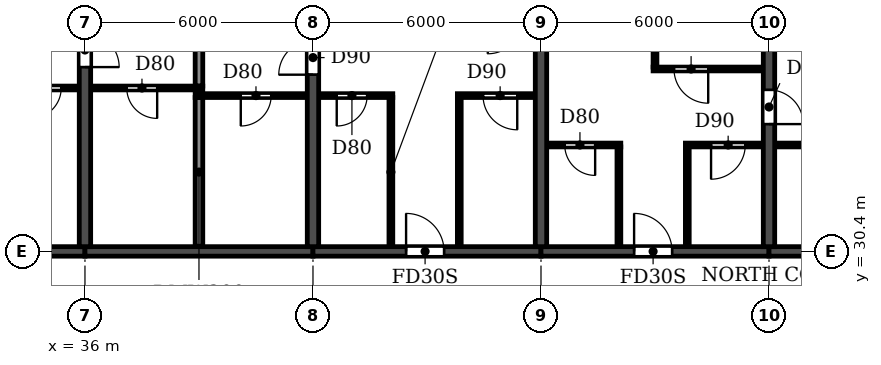
"""IFC4 building model, lengths in metres.
Left out: names, types, materials, properties, quantities, classifications, styles, units other than length and angle.
Written with IfcOpenShell. Run it as: python <this file> out.ifc"""

import sys

from ifc_helpers import new_model, si_unit, direction, frame, frame_2d, origin, place, context, subcontext, project, spatial, rectangle, extrude, element, fill, save


model = new_model("IFC4")
c1 = context("Model", 3, precision=1e-05, world=origin(), true_north=direction((0.0, 1.0)))
c2 = subcontext(c1, "Body", "Model", "MODEL_VIEW")
j1 = project(units=[si_unit("LENGTHUNIT", "METRE"), si_unit("PLANEANGLEUNIT", "RADIAN")], contexts=[c1])
p1 = place(None, origin())
s1 = spatial("IfcSite", under=j1, at=p1, CompositionType="ELEMENT")
p2 = place(p1, origin())
s2 = spatial("IfcBuilding", under=s1, at=p2, CompositionType="ELEMENT")
p3 = place(p2, frame((0.0, 0.0, 155.4)))
s3 = spatial("IfcBuildingStorey", under=s2, at=p3, CompositionType="ELEMENT", Elevation=155.4)
p4 = place(p3, frame((36.0, 30.525, 0.0), z_axis=(0.0, 0.0, 1.0), x_axis=(0.0, 1.0, 0.0)))
e1 = element("IfcWall", 1, at=p4, inside=s3, PredefinedType="SHEAR", context=c2, shape_type="SweptSolid", body=[
    extrude(rectangle(XDim=11.675, YDim=0.3, at=frame_2d((5.837, 0.0))), origin(), (0.0, 0.0, 1.0), 3.0),
])
p5 = place(p4, frame((4.725, 0.0, 0.0)))
e2 = element("IfcOpeningElement", 2, at=p5, cuts=e1, PredefinedType="OPENING", context=c2, shape_type="SweptSolid", body=[
    extrude(rectangle(XDim=0.9, YDim=2.1, at=frame_2d((0.45, 1.05))), frame((0.0, 0.16, 0.0), z_axis=(0.0, -1.0, 0.0), x_axis=(1.0, 0.0, 0.0)), (0.0, 0.0, 1.0), 0.32),
])
p6 = place(p3, frame((42.0, 30.525, 0.0), z_axis=(0.0, 0.0, 1.0), x_axis=(0.0, 1.0, 0.0)))
e3 = element("IfcWall", 3, at=p6, inside=s3, PredefinedType="SHEAR", context=c2, shape_type="SweptSolid", body=[
    extrude(rectangle(XDim=11.675, YDim=0.3, at=frame_2d((5.837, 0.0))), origin(), (0.0, 0.0, 1.0), 3.0),
])
p7 = place(p6, frame((4.525, 0.0, 0.0)))
e4 = element("IfcOpeningElement", 4, at=p7, cuts=e3, PredefinedType="OPENING", context=c2, shape_type="SweptSolid", body=[
    extrude(rectangle(XDim=0.9, YDim=2.1, at=frame_2d((0.45, 1.05))), frame((0.0, 0.16, 0.0), z_axis=(0.0, -1.0, 0.0), x_axis=(1.0, 0.0, 0.0)), (0.0, 0.0, 1.0), 0.32),
])
p8 = place(p3, frame((48.0, 30.525, 0.0), z_axis=(0.0, 0.0, 1.0), x_axis=(0.0, 1.0, 0.0)))
e5 = element("IfcWall", 5, at=p8, inside=s3, PredefinedType="SHEAR", context=c2, shape_type="SweptSolid", body=[
    extrude(rectangle(XDim=11.675, YDim=0.3, at=frame_2d((5.837, 0.0))), origin(), (0.0, 0.0, 1.0), 3.0),
])
p9 = place(p3, frame((54.0, 30.525, 0.0), z_axis=(0.0, 0.0, 1.0), x_axis=(0.0, 1.0, 0.0)))
e6 = element("IfcWall", 6, at=p9, inside=s3, PredefinedType="SHEAR", context=c2, shape_type="SweptSolid", body=[
    extrude(rectangle(XDim=11.675, YDim=0.3, at=frame_2d((5.837, 0.0))), origin(), (0.0, 0.0, 1.0), 3.0),
])
p10 = place(p9, frame((3.225, 0.0, 0.0)))
e7 = element("IfcOpeningElement", 7, at=p10, cuts=e6, PredefinedType="OPENING", context=c2, shape_type="SweptSolid", body=[
    extrude(rectangle(XDim=0.9, YDim=2.1, at=frame_2d((0.45, 1.05))), frame((0.0, 0.16, 0.0), z_axis=(0.0, -1.0, 0.0), x_axis=(1.0, 0.0, 0.0)), (0.0, 0.0, 1.0), 0.32),
])
p11 = place(p3, frame((30.0, 30.4, 0.0), z_axis=(0.0, 0.0, 1.0), x_axis=(1.0, 0.0, 0.0)))
e8 = element("IfcWall", 8, at=p11, inside=s3, PredefinedType="SHEAR", context=c2, shape_type="SweptSolid", body=[
    extrude(rectangle(XDim=6.0, YDim=0.25, at=frame_2d((3.0, 0.0))), origin(), (0.0, 0.0, 1.0), 2.4),
])
p12 = place(p11, frame((2.55, 0.0, 0.0)))
e9 = element("IfcOpeningElement", 9, at=p12, cuts=e8, PredefinedType="OPENING", context=c2, shape_type="SweptSolid", body=[
    extrude(rectangle(XDim=1.0, YDim=2.1, at=frame_2d((0.5, 1.05))), frame((0.0, 0.135, 0.0), z_axis=(0.0, -1.0, 0.0), x_axis=(1.0, 0.0, 0.0)), (0.0, 0.0, 1.0), 0.27),
])
p13 = place(p3, frame((36.0, 30.4, 0.0), z_axis=(0.0, 0.0, 1.0), x_axis=(1.0, 0.0, 0.0)))
e10 = element("IfcWall", 10, at=p13, inside=s3, PredefinedType="SHEAR", context=c2, shape_type="SweptSolid", body=[
    extrude(rectangle(XDim=6.0, YDim=0.25, at=frame_2d((3.0, 0.0))), origin(), (0.0, 0.0, 1.0), 2.4),
])
p14 = place(p3, frame((42.0, 30.4, 0.0), z_axis=(0.0, 0.0, 1.0), x_axis=(1.0, 0.0, 0.0)))
e11 = element("IfcWall", 11, at=p14, inside=s3, PredefinedType="SHEAR", context=c2, shape_type="SweptSolid", body=[
    extrude(rectangle(XDim=6.0, YDim=0.25, at=frame_2d((3.0, 0.0))), origin(), (0.0, 0.0, 1.0), 2.4),
])
p15 = place(p14, frame((2.45, 0.0, 0.0)))
e12 = element("IfcOpeningElement", 12, at=p15, cuts=e11, PredefinedType="OPENING", context=c2, shape_type="SweptSolid", body=[
    extrude(rectangle(XDim=1.0, YDim=2.1, at=frame_2d((0.5, 1.05))), frame((0.0, 0.135, 0.0), z_axis=(0.0, -1.0, 0.0), x_axis=(1.0, 0.0, 0.0)), (0.0, 0.0, 1.0), 0.27),
])
p16 = place(p3, frame((48.0, 30.4, 0.0), z_axis=(0.0, 0.0, 1.0), x_axis=(1.0, 0.0, 0.0)))
e13 = element("IfcWall", 13, at=p16, inside=s3, PredefinedType="SHEAR", context=c2, shape_type="SweptSolid", body=[
    extrude(rectangle(XDim=6.0, YDim=0.25, at=frame_2d((3.0, 0.0))), origin(), (0.0, 0.0, 1.0), 2.4),
])
p17 = place(p16, frame((2.45, 0.0, 0.0)))
e14 = element("IfcOpeningElement", 14, at=p17, cuts=e13, PredefinedType="OPENING", context=c2, shape_type="SweptSolid", body=[
    extrude(rectangle(XDim=1.0, YDim=2.1, at=frame_2d((0.5, 1.05))), frame((0.0, 0.135, 0.0), z_axis=(0.0, -1.0, 0.0), x_axis=(1.0, 0.0, 0.0)), (0.0, 0.0, 1.0), 0.27),
])
p18 = place(p3, frame((54.0, 30.4, 0.0), z_axis=(0.0, 0.0, 1.0), x_axis=(1.0, 0.0, 0.0)))
e15 = element("IfcWall", 15, at=p18, inside=s3, PredefinedType="SHEAR", context=c2, shape_type="SweptSolid", body=[
    extrude(rectangle(XDim=6.0, YDim=0.25, at=frame_2d((3.0, 0.0))), origin(), (0.0, 0.0, 1.0), 2.4),
])
p19 = place(p3, frame((39.0, 30.535, 0.0), z_axis=(0.0, 0.0, 1.0), x_axis=(0.0, 1.0, 0.0)))
e16 = element("IfcWall", 16, at=p19, inside=s3, PredefinedType="PARTITIONING", context=c2, shape_type="SweptSolid", body=[
    extrude(rectangle(XDim=3.915, YDim=0.2, at=frame_2d((1.958, 0.0))), origin(), (0.0, 0.0, 1.0), 3.0),
])
p20 = place(p3, frame((39.0, 34.75, 0.0), z_axis=(0.0, 0.0, 1.0), x_axis=(0.0, 1.0, 0.0)))
e17 = element("IfcWall", 17, at=p20, inside=s3, PredefinedType="PARTITIONING", context=c2, shape_type="SweptSolid", body=[
    extrude(rectangle(XDim=7.59, YDim=0.2, at=frame_2d((3.795, 0.0))), origin(), (0.0, 0.0, 1.0), 3.0),
])
p21 = place(p3, frame((48.16, 33.2, 0.0), z_axis=(0.0, 0.0, 1.0), x_axis=(1.0, 0.0, 0.0)))
e18 = element("IfcWall", 18, at=p21, inside=s3, PredefinedType="PARTITIONING", context=c2, shape_type="SweptSolid", body=[
    extrude(rectangle(XDim=1.94, YDim=0.1, at=frame_2d((0.97, 0.0))), origin(), (0.0, 0.0, 1.0), 3.0),
])
p22 = place(p21, frame((0.465, 0.0, 0.0)))
e19 = element("IfcOpeningElement", 19, at=p22, cuts=e18, PredefinedType="OPENING", context=c2, shape_type="SweptSolid", body=[
    extrude(rectangle(XDim=0.8, YDim=2.1, at=frame_2d((0.4, 1.05))), frame((0.0, 0.06, 0.0), z_axis=(0.0, -1.0, 0.0), x_axis=(1.0, 0.0, 0.0)), (0.0, 0.0, 1.0), 0.12),
])
p23 = place(p3, frame((51.8, 33.2, 0.0), z_axis=(0.0, 0.0, 1.0), x_axis=(1.0, 0.0, 0.0)))
e20 = element("IfcWall", 20, at=p23, inside=s3, PredefinedType="PARTITIONING", context=c2, shape_type="SweptSolid", body=[
    extrude(rectangle(XDim=2.04, YDim=0.1, at=frame_2d((1.02, 0.0))), origin(), (0.0, 0.0, 1.0), 3.0),
])
p24 = place(p23, frame((0.675, 0.0, 0.0)))
e21 = element("IfcOpeningElement", 21, at=p24, cuts=e20, PredefinedType="OPENING", context=c2, shape_type="SweptSolid", body=[
    extrude(rectangle(XDim=0.9, YDim=2.1, at=frame_2d((0.45, 1.05))), frame((0.0, 0.06, 0.0), z_axis=(0.0, -1.0, 0.0), x_axis=(1.0, 0.0, 0.0)), (0.0, 0.0, 1.0), 0.12),
])
p25 = place(p3, frame((54.16, 33.2, 0.0), z_axis=(0.0, 0.0, 1.0), x_axis=(1.0, 0.0, 0.0)))
e22 = element("IfcWall", 22, at=p25, inside=s3, PredefinedType="PARTITIONING", context=c2, shape_type="SweptSolid", body=[
    extrude(rectangle(XDim=2.74, YDim=0.1, at=frame_2d((1.37, 0.0))), origin(), (0.0, 0.0, 1.0), 3.0),
])
p26 = place(p25, frame((0.94, 0.0, 0.0)))
e23 = element("IfcOpeningElement", 23, at=p26, cuts=e22, PredefinedType="OPENING", context=c2, shape_type="SweptSolid", body=[
    extrude(rectangle(XDim=0.8, YDim=2.1, at=frame_2d((0.4, 1.05))), frame((0.0, 0.06, 0.0), z_axis=(0.0, -1.0, 0.0), x_axis=(1.0, 0.0, 0.0)), (0.0, 0.0, 1.0), 0.12),
])
p27 = place(p3, frame((38.9, 34.5, 0.0), z_axis=(0.0, 0.0, 1.0), x_axis=(1.0, 0.0, 0.0)))
e24 = element("IfcWall", 24, at=p27, inside=s3, PredefinedType="PARTITIONING", context=c2, shape_type="SweptSolid", body=[
    extrude(rectangle(XDim=2.94, YDim=0.1, at=frame_2d((1.47, 0.0))), origin(), (0.0, 0.0, 1.0), 3.0),
])
p28 = place(p27, frame((1.2, 0.0, 0.0)))
e25 = element("IfcOpeningElement", 25, at=p28, cuts=e24, PredefinedType="OPENING", context=c2, shape_type="SweptSolid", body=[
    extrude(rectangle(XDim=0.8, YDim=2.1, at=frame_2d((0.4, 1.05))), frame((0.0, 0.06, 0.0), z_axis=(0.0, -1.0, 0.0), x_axis=(1.0, 0.0, 0.0)), (0.0, 0.0, 1.0), 0.12),
])
p29 = place(p3, frame((42.16, 34.5, 0.0), z_axis=(0.0, 0.0, 1.0), x_axis=(1.0, 0.0, 0.0)))
e26 = element("IfcWall", 26, at=p29, inside=s3, PredefinedType="PARTITIONING", context=c2, shape_type="SweptSolid", body=[
    extrude(rectangle(XDim=1.94, YDim=0.1, at=frame_2d((0.97, 0.0))), origin(), (0.0, 0.0, 1.0), 3.0),
])
p30 = place(p29, frame((0.465, 0.0, 0.0)))
e27 = element("IfcOpeningElement", 27, at=p30, cuts=e26, PredefinedType="OPENING", context=c2, shape_type="SweptSolid", body=[
    extrude(rectangle(XDim=0.8, YDim=2.1, at=frame_2d((0.4, 1.05))), frame((0.0, 0.06, 0.0), z_axis=(0.0, -1.0, 0.0), x_axis=(1.0, 0.0, 0.0)), (0.0, 0.0, 1.0), 0.12),
])
p31 = place(p3, frame((45.8, 34.5, 0.0), z_axis=(0.0, 0.0, 1.0), x_axis=(1.0, 0.0, 0.0)))
e28 = element("IfcWall", 28, at=p31, inside=s3, PredefinedType="PARTITIONING", context=c2, shape_type="SweptSolid", body=[
    extrude(rectangle(XDim=2.04, YDim=0.1, at=frame_2d((1.02, 0.0))), origin(), (0.0, 0.0, 1.0), 3.0),
])
p32 = place(p31, frame((0.675, 0.0, 0.0)))
e29 = element("IfcOpeningElement", 29, at=p32, cuts=e28, PredefinedType="OPENING", context=c2, shape_type="SweptSolid", body=[
    extrude(rectangle(XDim=0.9, YDim=2.1, at=frame_2d((0.45, 1.05))), frame((0.0, 0.06, 0.0), z_axis=(0.0, -1.0, 0.0), x_axis=(1.0, 0.0, 0.0)), (0.0, 0.0, 1.0), 0.12),
])
p33 = place(p3, frame((33.9, 34.7, 0.0), z_axis=(0.0, 0.0, 1.0), x_axis=(1.0, 0.0, 0.0)))
e30 = element("IfcWall", 30, at=p33, inside=s3, PredefinedType="PARTITIONING", context=c2, shape_type="SweptSolid", body=[
    extrude(rectangle(XDim=1.94, YDim=0.1, at=frame_2d((0.97, 0.0))), origin(), (0.0, 0.0, 1.0), 3.0),
])
p34 = place(p33, frame((0.675, 0.0, 0.0)))
e31 = element("IfcOpeningElement", 31, at=p34, cuts=e30, PredefinedType="OPENING", context=c2, shape_type="SweptSolid", body=[
    extrude(rectangle(XDim=0.8, YDim=2.1, at=frame_2d((0.4, 1.05))), frame((0.0, 0.06, 0.0), z_axis=(0.0, -1.0, 0.0), x_axis=(1.0, 0.0, 0.0)), (0.0, 0.0, 1.0), 0.12),
])
p35 = place(p3, frame((36.16, 34.7, 0.0), z_axis=(0.0, 0.0, 1.0), x_axis=(1.0, 0.0, 0.0)))
e32 = element("IfcWall", 32, at=p35, inside=s3, PredefinedType="PARTITIONING", context=c2, shape_type="SweptSolid", body=[
    extrude(rectangle(XDim=2.94, YDim=0.1, at=frame_2d((1.47, 0.0))), origin(), (0.0, 0.0, 1.0), 3.0),
])
p36 = place(p35, frame((0.94, 0.0, 0.0)))
e33 = element("IfcOpeningElement", 33, at=p36, cuts=e32, PredefinedType="OPENING", context=c2, shape_type="SweptSolid", body=[
    extrude(rectangle(XDim=0.8, YDim=2.1, at=frame_2d((0.4, 1.05))), frame((0.0, 0.06, 0.0), z_axis=(0.0, -1.0, 0.0), x_axis=(1.0, 0.0, 0.0)), (0.0, 0.0, 1.0), 0.12),
])
p37 = place(p3, frame((50.95, 35.2, 0.0), z_axis=(0.0, 0.0, 1.0), x_axis=(1.0, 0.0, 0.0)))
e34 = element("IfcWall", 34, at=p37, inside=s3, PredefinedType="PARTITIONING", context=c2, shape_type="SweptSolid", body=[
    extrude(rectangle(XDim=2.89, YDim=0.1, at=frame_2d((1.445, 0.0))), origin(), (0.0, 0.0, 1.0), 3.0),
])
p38 = place(p37, frame((0.55, 0.0, 0.0)))
e35 = element("IfcOpeningElement", 35, at=p38, cuts=e34, PredefinedType="OPENING", context=c2, shape_type="SweptSolid", body=[
    extrude(rectangle(XDim=0.9, YDim=2.1, at=frame_2d((0.45, 1.05))), frame((0.0, 0.06, 0.0), z_axis=(0.0, -1.0, 0.0), x_axis=(1.0, 0.0, 0.0)), (0.0, 0.0, 1.0), 0.12),
])
for number, where, z_axis, x_axis in (
    (36, (44.05, 30.535, 0.0), (0.0, 0.0, 1.0), (0.0, 1.0, 0.0)),
    (37, (45.85, 30.535, 0.0), (0.0, 0.0, 1.0), (0.0, 1.0, 0.0)),
):
    element("IfcWall", number, at=place(p3, frame(where, z_axis=z_axis, x_axis=x_axis)), inside=s3, PredefinedType="PARTITIONING", context=c2, shape_type="SweptSolid", body=[
        extrude(rectangle(XDim=3.915, YDim=0.1, at=frame_2d((1.958, 0.0))), origin(), (0.0, 0.0, 1.0), 3.0),
    ])
p39 = place(p3, frame((50.05, 30.535, 0.0), z_axis=(0.0, 0.0, 1.0), x_axis=(0.0, 1.0, 0.0)))
e38 = element("IfcWall", 38, at=p39, inside=s3, PredefinedType="PARTITIONING", context=c2, shape_type="SweptSolid", body=[
    extrude(rectangle(XDim=2.615, YDim=0.1, at=frame_2d((1.308, 0.0))), origin(), (0.0, 0.0, 1.0), 3.0),
])
p40 = place(p3, frame((51.0, 35.25, 0.0), z_axis=(0.0, 0.0, 1.0), x_axis=(0.0, 1.0, 0.0)))
e39 = element("IfcWall", 39, at=p40, inside=s3, PredefinedType="PARTITIONING", context=c2, shape_type="SweptSolid", body=[
    extrude(rectangle(XDim=7.09, YDim=0.1, at=frame_2d((3.545, 0.0))), origin(), (0.0, 0.0, 1.0), 3.0),
])
p41 = place(p3, frame((51.85, 30.535, 0.0), z_axis=(0.0, 0.0, 1.0), x_axis=(0.0, 1.0, 0.0)))
e40 = element("IfcWall", 40, at=p41, inside=s3, PredefinedType="PARTITIONING", context=c2, shape_type="SweptSolid", body=[
    extrude(rectangle(XDim=2.615, YDim=0.1, at=frame_2d((1.308, 0.0))), origin(), (0.0, 0.0, 1.0), 3.0),
])
p42 = place(p36, frame((0.8, 0.0, 0.0), z_axis=(0.0, 0.0, 1.0), x_axis=(-1.0, 0.0, 0.0)))
e41 = element("IfcDoor", 41, at=p42, inside=s3, OperationType="SINGLE_SWING_LEFT", PredefinedType="DOOR", context=c2, shape_type="SweptSolid", body=[
    extrude(rectangle(XDim=0.8, YDim=2.1, at=frame_2d((0.4, 1.05))), frame((0.0, 0.025, 0.0), z_axis=(0.0, -1.0, 0.0), x_axis=(1.0, 0.0, 0.0)), (0.0, 0.0, 1.0), 0.05),
])
fill(e33, e41)
p43 = place(p34, frame((0.8, 0.0, 0.0), z_axis=(0.0, 0.0, 1.0), x_axis=(-1.0, 0.0, 0.0)))
e42 = element("IfcDoor", 42, at=p43, inside=s3, OperationType="SINGLE_SWING_RIGHT", PredefinedType="DOOR", context=c2, shape_type="SweptSolid", body=[
    extrude(rectangle(XDim=0.8, YDim=2.1, at=frame_2d((0.4, 1.05))), frame((0.0, 0.025, 0.0), z_axis=(0.0, -1.0, 0.0), x_axis=(1.0, 0.0, 0.0)), (0.0, 0.0, 1.0), 0.05),
])
fill(e31, e42)
p44 = place(p5, frame((0.9, 0.0, 0.0), z_axis=(0.0, 0.0, 1.0), x_axis=(-1.0, 0.0, 0.0)))
e43 = element("IfcDoor", 43, at=p44, inside=s3, OperationType="SINGLE_SWING_RIGHT", PredefinedType="DOOR", context=c2, shape_type="SweptSolid", body=[
    extrude(rectangle(XDim=0.9, YDim=2.1, at=frame_2d((0.45, 1.05))), frame((0.0, 0.025, 0.0), z_axis=(0.0, -1.0, 0.0), x_axis=(1.0, 0.0, 0.0)), (0.0, 0.0, 1.0), 0.05),
])
fill(e2, e43)
p45 = place(p28, frame((0.8, 0.0, 0.0), z_axis=(0.0, 0.0, 1.0), x_axis=(-1.0, 0.0, 0.0)))
e44 = element("IfcDoor", 44, at=p45, inside=s3, OperationType="SINGLE_SWING_RIGHT", PredefinedType="DOOR", context=c2, shape_type="SweptSolid", body=[
    extrude(rectangle(XDim=0.8, YDim=2.1, at=frame_2d((0.4, 1.05))), frame((0.0, 0.025, 0.0), z_axis=(0.0, -1.0, 0.0), x_axis=(1.0, 0.0, 0.0)), (0.0, 0.0, 1.0), 0.05),
])
fill(e25, e44)
p46 = place(p7, origin())
e45 = element("IfcDoor", 45, at=p46, inside=s3, OperationType="SINGLE_SWING_LEFT", PredefinedType="DOOR", context=c2, shape_type="SweptSolid", body=[
    extrude(rectangle(XDim=0.9, YDim=2.1, at=frame_2d((0.45, 1.05))), frame((0.0, 0.025, 0.0), z_axis=(0.0, -1.0, 0.0), x_axis=(1.0, 0.0, 0.0)), (0.0, 0.0, 1.0), 0.05),
])
fill(e4, e45)
p47 = place(p30, frame((0.8, 0.0, 0.0), z_axis=(0.0, 0.0, 1.0), x_axis=(-1.0, 0.0, 0.0)))
e46 = element("IfcDoor", 46, at=p47, inside=s3, OperationType="SINGLE_SWING_RIGHT", PredefinedType="DOOR", context=c2, shape_type="SweptSolid", body=[
    extrude(rectangle(XDim=0.8, YDim=2.1, at=frame_2d((0.4, 1.05))), frame((0.0, 0.025, 0.0), z_axis=(0.0, -1.0, 0.0), x_axis=(1.0, 0.0, 0.0)), (0.0, 0.0, 1.0), 0.05),
])
fill(e27, e46)
p48 = place(p15, origin())
e47 = element("IfcDoor", 47, at=p48, inside=s3, OperationType="SINGLE_SWING_LEFT", PredefinedType="DOOR", context=c2, shape_type="SweptSolid", body=[
    extrude(rectangle(XDim=1.0, YDim=2.1, at=frame_2d((0.5, 1.05))), frame((0.0, 0.025, 0.0), z_axis=(0.0, -1.0, 0.0), x_axis=(1.0, 0.0, 0.0)), (0.0, 0.0, 1.0), 0.05),
])
fill(e12, e47)
p49 = place(p32, frame((0.9, 0.0, 0.0), z_axis=(0.0, 0.0, 1.0), x_axis=(-1.0, 0.0, 0.0)))
e48 = element("IfcDoor", 48, at=p49, inside=s3, OperationType="SINGLE_SWING_LEFT", PredefinedType="DOOR", context=c2, shape_type="SweptSolid", body=[
    extrude(rectangle(XDim=0.9, YDim=2.1, at=frame_2d((0.45, 1.05))), frame((0.0, 0.025, 0.0), z_axis=(0.0, -1.0, 0.0), x_axis=(1.0, 0.0, 0.0)), (0.0, 0.0, 1.0), 0.05),
])
fill(e29, e48)
p50 = place(p22, frame((0.8, 0.0, 0.0), z_axis=(0.0, 0.0, 1.0), x_axis=(-1.0, 0.0, 0.0)))
e49 = element("IfcDoor", 49, at=p50, inside=s3, OperationType="SINGLE_SWING_LEFT", PredefinedType="DOOR", context=c2, shape_type="SweptSolid", body=[
    extrude(rectangle(XDim=0.8, YDim=2.1, at=frame_2d((0.4, 1.05))), frame((0.0, 0.025, 0.0), z_axis=(0.0, -1.0, 0.0), x_axis=(1.0, 0.0, 0.0)), (0.0, 0.0, 1.0), 0.05),
])
fill(e19, e49)
p51 = place(p17, origin())
e50 = element("IfcDoor", 50, at=p51, inside=s3, OperationType="SINGLE_SWING_LEFT", PredefinedType="DOOR", context=c2, shape_type="SweptSolid", body=[
    extrude(rectangle(XDim=1.0, YDim=2.1, at=frame_2d((0.5, 1.05))), frame((0.0, 0.025, 0.0), z_axis=(0.0, -1.0, 0.0), x_axis=(1.0, 0.0, 0.0)), (0.0, 0.0, 1.0), 0.05),
])
fill(e14, e50)
p52 = place(p38, frame((0.9, 0.0, 0.0), z_axis=(0.0, 0.0, 1.0), x_axis=(-1.0, 0.0, 0.0)))
e51 = element("IfcDoor", 51, at=p52, inside=s3, OperationType="SINGLE_SWING_LEFT", PredefinedType="DOOR", context=c2, shape_type="SweptSolid", body=[
    extrude(rectangle(XDim=0.9, YDim=2.1, at=frame_2d((0.45, 1.05))), frame((0.0, 0.025, 0.0), z_axis=(0.0, -1.0, 0.0), x_axis=(1.0, 0.0, 0.0)), (0.0, 0.0, 1.0), 0.05),
])
fill(e35, e51)
p53 = place(p24, frame((0.9, 0.0, 0.0), z_axis=(0.0, 0.0, 1.0), x_axis=(-1.0, 0.0, 0.0)))
e52 = element("IfcDoor", 52, at=p53, inside=s3, OperationType="SINGLE_SWING_RIGHT", PredefinedType="DOOR", context=c2, shape_type="SweptSolid", body=[
    extrude(rectangle(XDim=0.9, YDim=2.1, at=frame_2d((0.45, 1.05))), frame((0.0, 0.025, 0.0), z_axis=(0.0, -1.0, 0.0), x_axis=(1.0, 0.0, 0.0)), (0.0, 0.0, 1.0), 0.05),
])
fill(e21, e52)
p54 = place(p10, frame((0.9, 0.0, 0.0), z_axis=(0.0, 0.0, 1.0), x_axis=(-1.0, 0.0, 0.0)))
e53 = element("IfcDoor", 53, at=p54, inside=s3, OperationType="SINGLE_SWING_RIGHT", PredefinedType="DOOR", context=c2, shape_type="SweptSolid", body=[
    extrude(rectangle(XDim=0.9, YDim=2.1, at=frame_2d((0.45, 1.05))), frame((0.0, 0.025, 0.0), z_axis=(0.0, -1.0, 0.0), x_axis=(1.0, 0.0, 0.0)), (0.0, 0.0, 1.0), 0.05),
])
fill(e7, e53)
save(model, sys.argv[1])
